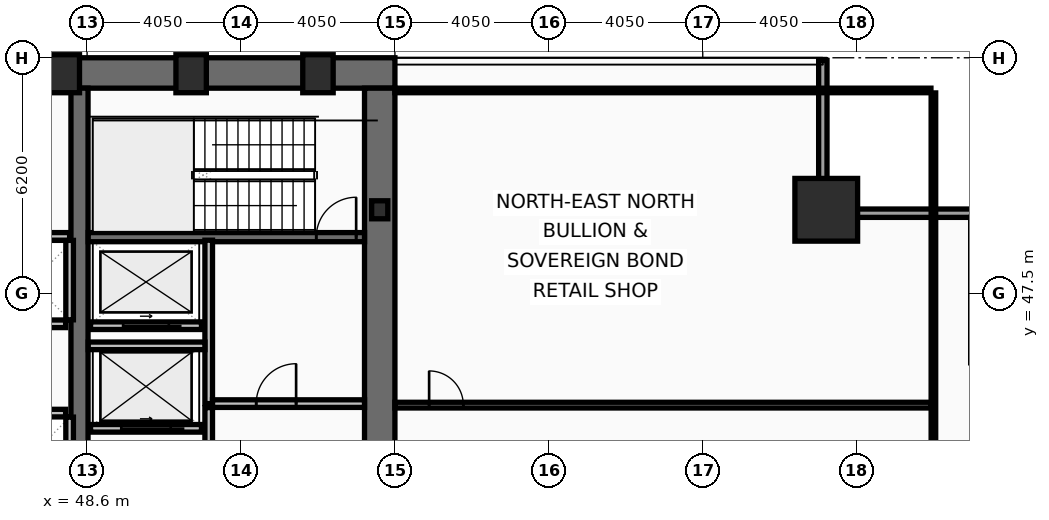
"""IFC4 building model, lengths in metres.
Left out: names, types, materials, properties, quantities, classifications, styles, units other than length and angle.
Written with IfcOpenShell. Run it as: python <this file> out.ifc"""

import sys

from ifc_helpers import new_model, si_unit, direction, frame, frame_2d, origin, origin_2d, place, context, subcontext, project, spatial, rectangle, hollow_rectangle, i_section, extrude, element, fill, save


model = new_model("IFC4")
c1 = context("Model", 3, precision=1e-05, world=origin(), true_north=direction((0.0, 1.0)))
c2 = subcontext(c1, "Body", "Model", "MODEL_VIEW")
j1 = project(units=[si_unit("LENGTHUNIT", "METRE"), si_unit("PLANEANGLEUNIT", "RADIAN")], contexts=[c1])
p1 = place(None, origin())
s1 = spatial("IfcSite", under=j1, at=p1, CompositionType="ELEMENT")
p2 = place(p1, origin())
s2 = spatial("IfcBuilding", under=s1, at=p2, CompositionType="ELEMENT")
p3 = place(p2, frame((0.0, 0.0, 65.8)))
s3 = spatial("IfcBuildingStorey", under=s2, at=p3, CompositionType="ELEMENT", Elevation=65.8)
p4 = place(p3, frame((16.2, 53.3, 0.0), z_axis=(0.0, 0.0, 1.0), x_axis=(1.0, 0.0, 0.0)))
e1 = element("IfcWall", 1, at=p4, inside=s3, PredefinedType="SHEAR", context=c2, shape_type="SweptSolid", body=[
    extrude(rectangle(XDim=40.5, YDim=0.8, at=frame_2d((20.25, 0.0))), origin(), (0.0, 0.0, 1.0), 3.82),
])
p5 = place(p3, frame((56.3, 52.9, 0.0), z_axis=(0.0, 0.0, 1.0), x_axis=(0.0, -1.0, 0.0)))
e2 = element("IfcWall", 2, at=p5, inside=s3, PredefinedType="SHEAR", context=c2, shape_type="SweptSolid", body=[
    extrude(rectangle(XDim=10.8, YDim=0.8, at=frame_2d((5.4, 0.0))), origin(), (0.0, 0.0, 1.0), 3.82),
])
p6 = place(p3, frame((48.4, 42.1, 0.0), z_axis=(0.0, 0.0, 1.0), x_axis=(0.0, 1.0, 0.0)))
e3 = element("IfcWall", 3, at=p6, inside=s3, PredefinedType="SHEAR", context=c2, shape_type="SweptSolid", body=[
    extrude(rectangle(XDim=10.8, YDim=0.45, at=frame_2d((5.4, 0.0))), origin(), (0.0, 0.0, 1.0), 3.82),
])
p7 = place(p3, frame((48.63, 48.98, 0.0), z_axis=(0.0, 0.0, 1.0), x_axis=(1.0, 0.0, 0.0)))
e4 = element("IfcWall", 4, at=p7, inside=s3, PredefinedType="SHEAR", context=c2, shape_type="SweptSolid", body=[
    extrude(rectangle(XDim=7.27, YDim=0.24, at=frame_2d((3.635, 0.0))), origin(), (0.0, 0.0, 1.0), 3.82),
])
p8 = place(p7, frame((6.0, 0.0, 0.0)))
e5 = element("IfcOpeningElement", 5, at=p8, cuts=e4, PredefinedType="OPENING", context=c2, shape_type="SweptSolid", body=[
    extrude(rectangle(XDim=1.05, YDim=2.15, at=frame_2d((0.525, 1.075))), frame((0.0, 0.13, 0.0), z_axis=(0.0, -1.0, 0.0), x_axis=(1.0, 0.0, 0.0)), (0.0, 0.0, 1.0), 0.26),
])
p9 = place(p3, frame((68.05, 49.7, 0.0), z_axis=(0.0, 0.0, 1.0), x_axis=(1.0, 0.0, 0.0)))
e6 = element("IfcColumn", 6, at=p9, inside=s3, PredefinedType="COLUMN", context=c2, shape_type="SweptSolid", body=[
    extrude(hollow_rectangle(XDim=1.65, YDim=1.65, WallThickness=0.075, at=origin_2d()), origin(), (0.0, 0.0, 1.0), 4.0),
])
for number, where, z_axis, x_axis in (
    (7, (48.0, 53.28, 0.0), (0.0, 0.0, 1.0), (1.0, 0.0, 0.0)),
    (8, (51.337, 53.28, 0.0), (0.0, 0.0, 1.0), (1.0, 0.0, 0.0)),
    (9, (54.675, 53.28, 0.0), (0.0, 0.0, 1.0), (1.0, 0.0, 0.0)),
):
    element("IfcColumn", number, at=place(p3, frame(where, z_axis=z_axis, x_axis=x_axis)), inside=s3, PredefinedType="COLUMN", context=c2, shape_type="SweptSolid", body=[
        extrude(hollow_rectangle(XDim=0.8, YDim=1.0, WallThickness=0.055, at=origin_2d()), origin(), (0.0, 0.0, 1.0), 4.0),
    ])
p10 = place(p3, frame((56.3, 49.7, 0.0), z_axis=(0.0, 0.0, 1.0), x_axis=(1.0, 0.0, 0.0)))
e10 = element("IfcColumn", 10, at=p10, inside=s3, PredefinedType="COLUMN", context=c2, shape_type="SweptSolid", body=[
    extrude(i_section(OverallWidth=0.424, OverallDepth=0.474, WebThickness=0.048, FlangeThickness=0.077, at=origin_2d()), origin(), (0.0, 0.0, 1.0), 4.0),
])
p11 = place(p3, frame((67.96, 53.63, 0.0), z_axis=(0.0, 0.0, 1.0), x_axis=(0.0, -1.0, 0.0)))
e11 = element("IfcWall", 11, at=p11, inside=s3, PredefinedType="SOLIDWALL", context=c2, shape_type="SweptSolid", body=[
    extrude(rectangle(XDim=3.91, YDim=0.22, at=frame_2d((1.955, 0.0))), origin(), (0.0, 0.0, 1.0), 3.16),
])
p12 = place(p3, frame((67.85, 49.61, 0.0), z_axis=(0.0, 0.0, 1.0), x_axis=(1.0, 0.0, 0.0)))
e12 = element("IfcWall", 12, at=p12, inside=s3, PredefinedType="SOLIDWALL", context=c2, shape_type="SweptSolid", body=[
    extrude(rectangle(XDim=4.22, YDim=0.22, at=frame_2d((2.11, 0.0))), origin(), (0.0, 0.0, 1.0), 3.16),
])
p13 = place(p3, frame((51.61, 43.95, 0.0), z_axis=(0.0, 0.0, 1.0), x_axis=(-1.0, 0.0, 0.0)))
e13 = element("IfcWall", 13, at=p13, inside=s3, PredefinedType="PARTITIONING", context=c2, shape_type="SweptSolid", body=[
    extrude(rectangle(XDim=2.92, YDim=0.2, at=frame_2d((1.46, 0.0))), origin(), (0.0, 0.0, 1.0), 3.82),
])
p14 = place(p13, frame((0.81, 0.0, 0.0)))
e14 = element("IfcOpeningElement", 14, at=p14, cuts=e13, PredefinedType="OPENING", context=c2, shape_type="SweptSolid", body=[
    extrude(rectangle(XDim=1.3, YDim=2.18, at=frame_2d((0.65, 1.09))), frame((0.0, 0.11, 0.0), z_axis=(0.0, -1.0, 0.0), x_axis=(1.0, 0.0, 0.0)), (0.0, 0.0, 1.0), 0.22),
])
p15 = place(p3, frame((51.61, 46.65, 0.0), z_axis=(0.0, 0.0, 1.0), x_axis=(-1.0, 0.0, 0.0)))
e15 = element("IfcWall", 15, at=p15, inside=s3, PredefinedType="PARTITIONING", context=c2, shape_type="SweptSolid", body=[
    extrude(rectangle(XDim=2.92, YDim=0.2, at=frame_2d((1.46, 0.0))), origin(), (0.0, 0.0, 1.0), 3.82),
])
p16 = place(p15, frame((0.86, 0.0, 0.0)))
e16 = element("IfcOpeningElement", 16, at=p16, cuts=e15, PredefinedType="OPENING", context=c2, shape_type="SweptSolid", body=[
    extrude(rectangle(XDim=1.2, YDim=2.18, at=frame_2d((0.6, 1.09))), frame((0.0, 0.11, 0.0), z_axis=(0.0, -1.0, 0.0), x_axis=(1.0, 0.0, 0.0)), (0.0, 0.0, 1.0), 0.22),
])
p17 = place(p3, frame((51.8, 44.6, 0.0), z_axis=(0.0, 0.0, 1.0), x_axis=(0.0, 1.0, 0.0)))
e17 = element("IfcWall", 17, at=p17, inside=s3, PredefinedType="PARTITIONING", context=c2, shape_type="SweptSolid", body=[
    extrude(rectangle(XDim=4.3, YDim=0.2, at=frame_2d((2.15, 0.0))), origin(), (0.0, 0.0, 1.0), 3.82),
])
p18 = place(p3, frame((51.9, 44.6, 0.0), z_axis=(0.0, 0.0, 1.0), x_axis=(1.0, 0.0, 0.0)))
e18 = element("IfcWall", 18, at=p18, inside=s3, PredefinedType="PARTITIONING", context=c2, shape_type="SweptSolid", body=[
    extrude(rectangle(XDim=4.0, YDim=0.2, at=frame_2d((2.0, 0.0))), origin(), (0.0, 0.0, 1.0), 3.82),
])
p19 = place(p18, frame((1.15, 0.0, 0.0)))
e19 = element("IfcOpeningElement", 19, at=p19, cuts=e18, PredefinedType="OPENING", context=c2, shape_type="SweptSolid", body=[
    extrude(rectangle(XDim=1.05, YDim=2.15, at=frame_2d((0.525, 1.075))), frame((0.0, 0.11, 0.0), z_axis=(0.0, -1.0, 0.0), x_axis=(1.0, 0.0, 0.0)), (0.0, 0.0, 1.0), 0.22),
])
p20 = place(p3, frame((48.63, 46.12, 0.0), z_axis=(0.0, 0.0, 1.0), x_axis=(1.0, 0.0, 0.0)))
e20 = element("IfcWall", 20, at=p20, inside=s3, PredefinedType="PARTITIONING", context=c2, shape_type="SweptSolid", body=[
    extrude(rectangle(XDim=3.07, YDim=0.2, at=frame_2d((1.535, 0.0))), origin(), (0.0, 0.0, 1.0), 3.82),
])
p21 = place(p3, frame((51.8, 42.1, 0.0), z_axis=(0.0, 0.0, 1.0), x_axis=(0.0, 1.0, 0.0)))
e21 = element("IfcWall", 21, at=p21, inside=s3, PredefinedType="PARTITIONING", context=c2, shape_type="SweptSolid", body=[
    extrude(rectangle(XDim=2.395, YDim=0.2, at=frame_2d((1.198, 0.0))), origin(), (0.0, 0.0, 1.0), 3.82),
])
p22 = place(p21, frame((0.38, 0.0, 0.0)))
e22 = element("IfcOpeningElement", 22, at=p22, cuts=e21, PredefinedType="OPENING", context=c2, shape_type="SweptSolid", body=[
    extrude(rectangle(XDim=1.05, YDim=2.15, at=frame_2d((0.525, 1.075))), frame((0.0, 0.11, 0.0), z_axis=(0.0, -1.0, 0.0), x_axis=(1.0, 0.0, 0.0)), (0.0, 0.0, 1.0), 0.22),
])
p23 = place(p3, frame((41.825, 46.7, 0.0), z_axis=(0.0, 0.0, 1.0), x_axis=(1.0, 0.0, 0.0)))
e23 = element("IfcWall", 23, at=p23, inside=s3, PredefinedType="PARTITIONING", context=c2, shape_type="SweptSolid", body=[
    extrude(rectangle(XDim=6.21, YDim=0.2, at=frame_2d((3.105, 0.0))), origin(), (0.0, 0.0, 1.0), 3.82),
])
p24 = place(p3, frame((48.14, 46.805, 0.0), z_axis=(0.0, 0.0, 1.0), x_axis=(0.0, 1.0, 0.0)))
e24 = element("IfcWall", 24, at=p24, inside=s3, PredefinedType="PARTITIONING", context=c2, shape_type="SweptSolid", body=[
    extrude(rectangle(XDim=2.09, YDim=0.2, at=frame_2d((1.045, 0.0))), origin(), (0.0, 0.0, 1.0), 3.82),
])
p25 = place(p3, frame((41.825, 44.35, 0.0), z_axis=(0.0, 0.0, 1.0), x_axis=(1.0, 0.0, 0.0)))
e25 = element("IfcWall", 25, at=p25, inside=s3, PredefinedType="PARTITIONING", context=c2, shape_type="SweptSolid", body=[
    extrude(rectangle(XDim=6.21, YDim=0.2, at=frame_2d((3.105, 0.0))), origin(), (0.0, 0.0, 1.0), 3.82),
])
p26 = place(p3, frame((48.14, 42.15, 0.0), z_axis=(0.0, 0.0, 1.0), x_axis=(0.0, 1.0, 0.0)))
e26 = element("IfcWall", 26, at=p26, inside=s3, PredefinedType="PARTITIONING", context=c2, shape_type="SweptSolid", body=[
    extrude(rectangle(XDim=2.095, YDim=0.2, at=frame_2d((1.048, 0.0))), origin(), (0.0, 0.0, 1.0), 3.82),
])
p27 = place(p3, frame((40.58, 52.86, 0.0), z_axis=(0.0, 0.0, 1.0), x_axis=(1.0, 0.0, 0.0)))
e27 = element("IfcWall", 27, at=p27, inside=s3, PredefinedType="PARTITIONING", context=c2, shape_type="SweptSolid", body=[
    extrude(rectangle(XDim=7.56, YDim=0.12, at=frame_2d((3.78, 0.0))), origin(), (0.0, 0.0, 1.0), 3.82),
])
p28 = place(p3, frame((40.58, 49.0, 0.0), z_axis=(0.0, 0.0, 1.0), x_axis=(1.0, 0.0, 0.0)))
e28 = element("IfcWall", 28, at=p28, inside=s3, PredefinedType="PARTITIONING", context=c2, shape_type="SweptSolid", body=[
    extrude(rectangle(XDim=7.56, YDim=0.2, at=frame_2d((3.78, 0.0))), origin(), (0.0, 0.0, 1.0), 3.82),
])
p29 = place(p28, frame((0.16, 0.0, 0.0)))
e29 = element("IfcOpeningElement", 29, at=p29, cuts=e28, PredefinedType="OPENING", context=c2, shape_type="SweptSolid", body=[
    extrude(rectangle(XDim=0.95, YDim=2.1, at=frame_2d((0.475, 1.05))), frame((0.0, 0.11, 0.0), z_axis=(0.0, -1.0, 0.0), x_axis=(1.0, 0.0, 0.0)), (0.0, 0.0, 1.0), 0.22),
])
p30 = place(p3, frame((56.7, 44.56, 0.0), z_axis=(0.0, 0.0, 1.0), x_axis=(1.0, 0.0, 0.0)))
e30 = element("IfcWall", 30, at=p30, inside=s3, PredefinedType="PARTITIONING", context=c2, shape_type="SweptSolid", body=[
    extrude(rectangle(XDim=14.105, YDim=0.15, at=frame_2d((7.052, 0.0))), origin(), (0.0, 0.0, 1.0), 3.16),
])
p31 = place(p30, frame((0.9, 0.0, 0.0)))
e31 = element("IfcOpeningElement", 31, at=p31, cuts=e30, PredefinedType="OPENING", context=c2, shape_type="SweptSolid", body=[
    extrude(rectangle(XDim=0.9, YDim=2.05, at=frame_2d((0.45, 1.025))), frame((0.0, 0.085, 0.0), z_axis=(0.0, -1.0, 0.0), x_axis=(1.0, 0.0, 0.0)), (0.0, 0.0, 1.0), 0.17),
])
p32 = place(p3, frame((70.87, 10.665, 0.0), z_axis=(0.0, 0.0, 1.0), x_axis=(0.0, 1.0, 0.0)))
e32 = element("IfcWall", 32, at=p32, inside=s3, PredefinedType="PARTITIONING", context=c2, shape_type="SweptSolid", body=[
    extrude(rectangle(XDim=42.11, YDim=0.12, at=frame_2d((21.055, 0.0))), origin(), (0.0, 0.0, 1.0), 3.01),
])
p33 = place(p3, frame((56.7, 52.84, 0.0), z_axis=(0.0, 0.0, 1.0), x_axis=(1.0, 0.0, 0.0)))
e33 = element("IfcWall", 33, at=p33, inside=s3, PredefinedType="PARTITIONING", context=c2, shape_type="SweptSolid", body=[
    extrude(rectangle(XDim=14.105, YDim=0.12, at=frame_2d((7.052, 0.0))), origin(), (0.0, 0.0, 1.0), 3.82),
])
p34 = place(p8, origin())
e34 = element("IfcDoor", 34, at=p34, inside=s3, OperationType="SINGLE_SWING_RIGHT", PredefinedType="DOOR", context=c2, shape_type="SweptSolid", body=[
    extrude(rectangle(XDim=1.05, YDim=2.15, at=frame_2d((0.525, 1.075))), frame((0.0, 0.025, 0.0), z_axis=(0.0, -1.0, 0.0), x_axis=(1.0, 0.0, 0.0)), (0.0, 0.0, 1.0), 0.05),
])
fill(e5, e34)
p35 = place(p14, origin())
e35 = element("IfcDoor", 35, at=p35, inside=s3, OperationType="SLIDING_TO_LEFT", PredefinedType="DOOR", context=c2, shape_type="SweptSolid", body=[
    extrude(rectangle(XDim=1.3, YDim=2.18, at=frame_2d((0.65, 1.09))), frame((0.0, 0.025, 0.0), z_axis=(0.0, -1.0, 0.0), x_axis=(1.0, 0.0, 0.0)), (0.0, 0.0, 1.0), 0.05),
])
fill(e14, e35)
p36 = place(p16, origin())
e36 = element("IfcDoor", 36, at=p36, inside=s3, OperationType="SLIDING_TO_LEFT", PredefinedType="DOOR", context=c2, shape_type="SweptSolid", body=[
    extrude(rectangle(XDim=1.2, YDim=2.18, at=frame_2d((0.6, 1.09))), frame((0.0, 0.025, 0.0), z_axis=(0.0, -1.0, 0.0), x_axis=(1.0, 0.0, 0.0)), (0.0, 0.0, 1.0), 0.05),
])
fill(e16, e36)
p37 = place(p19, origin())
e37 = element("IfcDoor", 37, at=p37, inside=s3, OperationType="SINGLE_SWING_RIGHT", PredefinedType="DOOR", context=c2, shape_type="SweptSolid", body=[
    extrude(rectangle(XDim=1.05, YDim=2.15, at=frame_2d((0.525, 1.075))), frame((0.0, 0.025, 0.0), z_axis=(0.0, -1.0, 0.0), x_axis=(1.0, 0.0, 0.0)), (0.0, 0.0, 1.0), 0.05),
])
fill(e19, e37)
p38 = place(p31, origin())
e38 = element("IfcDoor", 38, at=p38, inside=s3, OperationType="SINGLE_SWING_LEFT", PredefinedType="DOOR", context=c2, shape_type="SweptSolid", body=[
    extrude(rectangle(XDim=0.9, YDim=2.05, at=frame_2d((0.45, 1.025))), frame((0.0, 0.025, 0.0), z_axis=(0.0, -1.0, 0.0), x_axis=(1.0, 0.0, 0.0)), (0.0, 0.0, 1.0), 0.05),
])
fill(e31, e38)
save(model, sys.argv[1])
